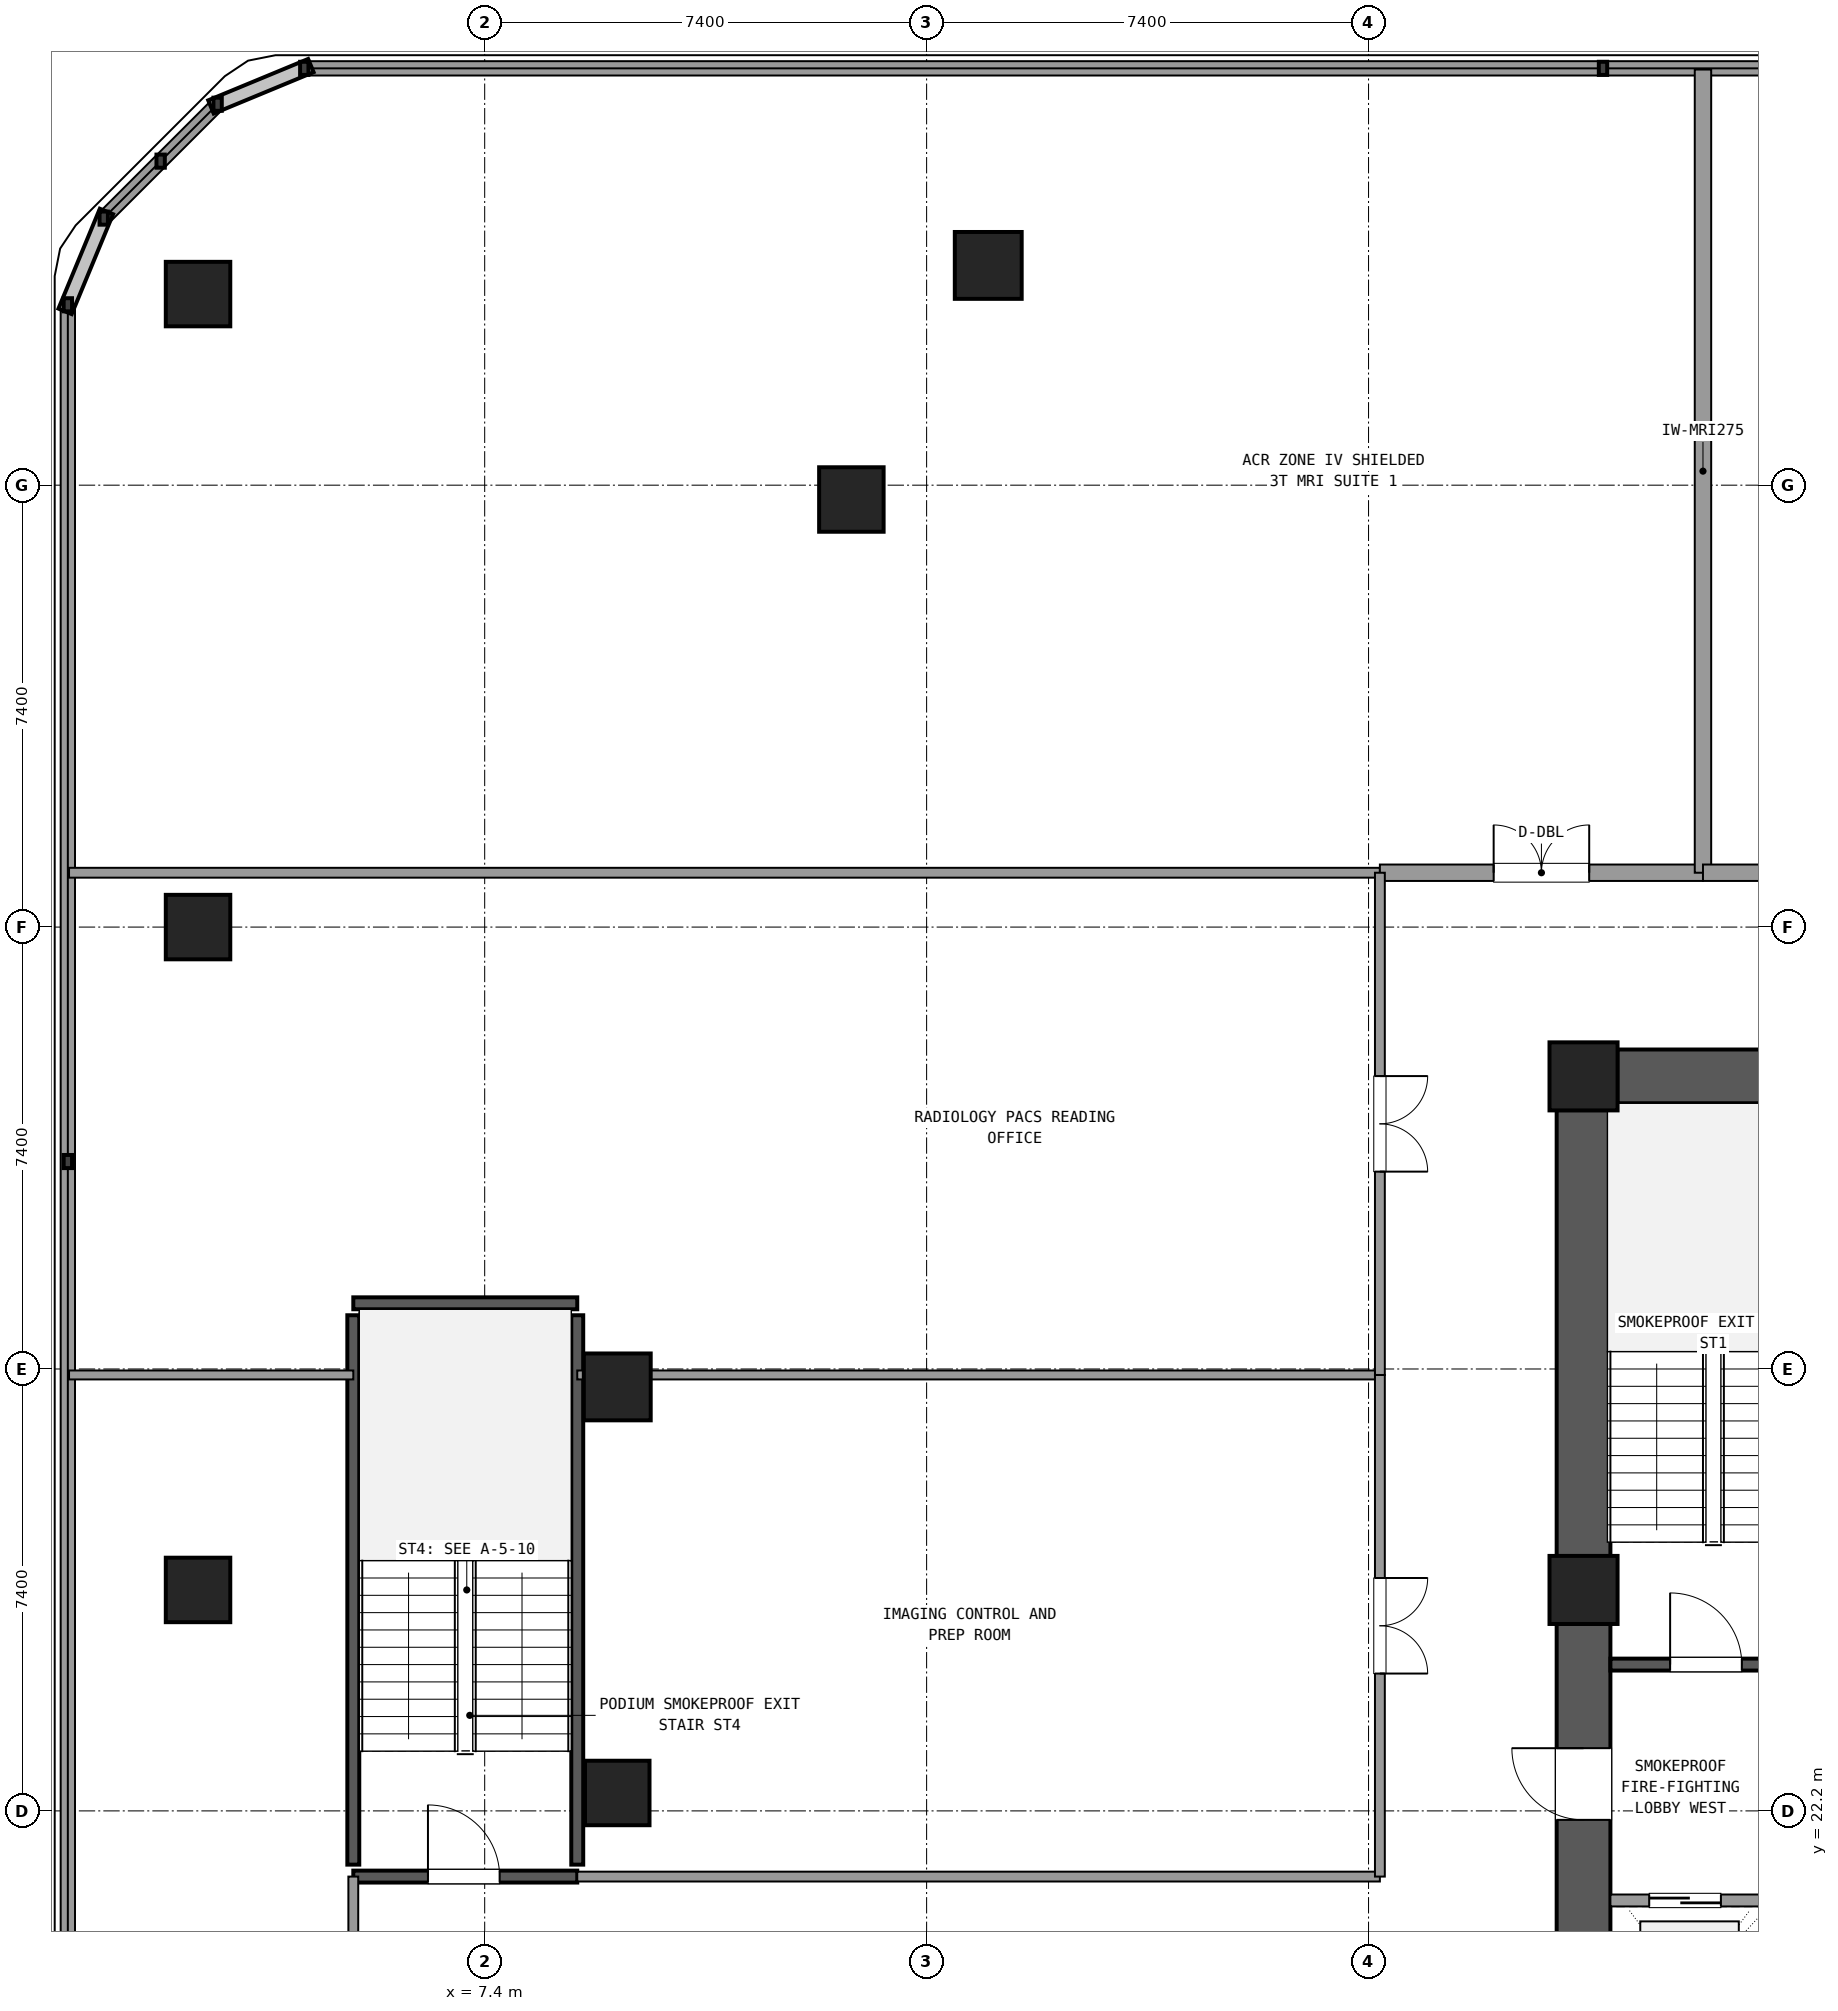
"""IFC4 building model, lengths in metres.
Left out: names, types, materials, properties, quantities, classifications, styles, units other than length and angle.
Written with IfcOpenShell. Run it as: python <this file> out.ifc"""

import sys

from ifc_helpers import new_model, si_unit, direction, frame, frame_2d, origin, origin_2d, place, context, subcontext, project, spatial, rectangle, circle, extrude, element, fill, save


model = new_model("IFC4")
c1 = context("Model", 3, precision=1e-05, world=origin(), true_north=direction((0.0, 1.0)))
c2 = subcontext(c1, "Body", "Model", "MODEL_VIEW")
j1 = project(units=[si_unit("LENGTHUNIT", "METRE"), si_unit("PLANEANGLEUNIT", "RADIAN")], contexts=[c1])
p1 = place(None, origin())
s1 = spatial("IfcSite", under=j1, at=p1, CompositionType="ELEMENT")
p2 = place(p1, origin())
s2 = spatial("IfcBuilding", under=s1, at=p2, CompositionType="ELEMENT")
p3 = place(p2, frame((0.0, 0.0, 9.9)))
s3 = spatial("IfcBuildingStorey", under=s2, at=p3, CompositionType="ELEMENT", Elevation=9.9)
for number, where, z_axis, x_axis in (
    (1, (25.8, 34.5, 0.0), (0.0, 0.0, 1.0), (1.0, 0.0, 0.0)),
    (2, (25.8, 25.9, 0.0), (0.0, 0.0, 1.0), (1.0, 0.0, 0.0)),
):
    element("IfcColumn", number, at=place(p3, frame(where, z_axis=z_axis, x_axis=x_axis)), inside=s3, PredefinedType="COLUMN", context=c2, shape_type="SweptSolid", body=[
        extrude(rectangle(XDim=1.14, YDim=1.14, at=origin_2d()), origin(), (0.0, 0.0, 1.0), 4.5),
    ])
p4 = place(p3, frame((36.435, 34.5, 0.0), z_axis=(0.0, 0.0, 1.0), x_axis=(-1.0, 0.0, 0.0)))
e3 = element("IfcWall", 3, at=p4, inside=s3, PredefinedType="SHEAR", context=c2, shape_type="SweptSolid", body=[
    extrude(rectangle(XDim=10.07, YDim=0.9, at=frame_2d((5.035, 0.0))), origin(), (0.0, 0.0, 1.0), 4.2),
])
p5 = place(p4, frame((4.035, 0.0, 0.0)))
e4 = element("IfcOpeningElement", 4, at=p5, cuts=e3, PredefinedType="OPENING", context=c2, shape_type="SweptSolid", body=[
    extrude(rectangle(XDim=1.2, YDim=2.15, at=frame_2d((0.6, 1.075))), frame((0.0, 0.46, 0.0), z_axis=(0.0, -1.0, 0.0), x_axis=(1.0, 0.0, 0.0)), (0.0, 0.0, 1.0), 0.92),
])
p6 = place(p3, frame((25.8, 33.935, 0.0), z_axis=(0.0, 0.0, 1.0), x_axis=(0.0, -1.0, 0.0)))
e5 = element("IfcWall", 5, at=p6, inside=s3, PredefinedType="SHEAR", context=c2, shape_type="SweptSolid", body=[
    extrude(rectangle(XDim=7.47, YDim=0.9, at=frame_2d((3.735, 0.0))), origin(), (0.0, 0.0, 1.0), 4.2),
])
p7 = place(p3, frame((25.8, 25.335, 0.0), z_axis=(0.0, 0.0, 1.0), x_axis=(0.0, -1.0, 0.0)))
e6 = element("IfcWall", 6, at=p7, inside=s3, PredefinedType="SHEAR", context=c2, shape_type="SweptSolid", body=[
    extrude(rectangle(XDim=7.47, YDim=0.9, at=frame_2d((3.735, 0.0))), origin(), (0.0, 0.0, 1.0), 4.2),
])
p8 = place(p7, frame((2.085, 0.0, 0.0)))
e7 = element("IfcOpeningElement", 7, at=p8, cuts=e6, PredefinedType="OPENING", context=c2, shape_type="SweptSolid", body=[
    extrude(rectangle(XDim=1.2, YDim=2.15, at=frame_2d((0.6, 1.075))), frame((0.0, 0.46, 0.0), z_axis=(0.0, -1.0, 0.0), x_axis=(1.0, 0.0, 0.0)), (0.0, 0.0, 1.0), 0.92),
])
p9 = place(p3, frame((9.62, 22.5, 0.0), z_axis=(0.0, 0.0, 1.0), x_axis=(1.0, 0.0, 0.0)))
e8 = element("IfcColumn", 8, at=p9, inside=s3, PredefinedType="COLUMN", context=c2, shape_type="SweptSolid", body=[
    extrude(rectangle(XDim=1.08, YDim=1.08, at=origin_2d()), origin(), (0.0, 0.0, 1.0), 4.5),
])
p10 = place(p3, frame((15.832, 48.08, 0.0), z_axis=(0.0, 0.0, 1.0), x_axis=(1.0, 0.0, 0.0)))
e9 = element("IfcColumn", 9, at=p10, inside=s3, PredefinedType="COLUMN", context=c2, shape_type="SweptSolid", body=[
    extrude(circle(Radius=0.56, at=origin_2d()), origin(), (0.0, 0.0, 1.0), 4.5),
])
p11 = place(p3, frame((13.54, 44.16, 0.0), z_axis=(0.0, 0.0, 1.0), x_axis=(1.0, 0.0, 0.0)))
e10 = element("IfcColumn", 10, at=p11, inside=s3, PredefinedType="COLUMN", context=c2, shape_type="SweptSolid", body=[
    extrude(rectangle(XDim=1.08, YDim=1.08, at=origin_2d()), origin(), (0.0, 0.0, 1.0), 4.5),
])
p12 = place(p3, frame((9.62, 29.3, 0.0), z_axis=(0.0, 0.0, 1.0), x_axis=(1.0, 0.0, 0.0)))
e11 = element("IfcColumn", 11, at=p12, inside=s3, PredefinedType="COLUMN", context=c2, shape_type="SweptSolid", body=[
    extrude(circle(Radius=0.56, at=origin_2d()), origin(), (0.0, 0.0, 1.0), 4.5),
])
for number, where, z_axis, x_axis in (
    (12, (2.6, 25.9, 0.0), (0.0, 0.0, 1.0), (1.0, 0.0, 0.0)),
    (13, (2.6, 37.0, 0.0), (0.0, 0.0, 1.0), (1.0, 0.0, 0.0)),
    (14, (2.6, 47.6, 0.0), (0.0, 0.0, 1.0), (1.0, 0.0, 0.0)),
):
    element("IfcColumn", number, at=place(p3, frame(where, z_axis=z_axis, x_axis=x_axis)), inside=s3, PredefinedType="COLUMN", context=c2, shape_type="SweptSolid", body=[
        extrude(rectangle(XDim=1.08, YDim=1.08, at=origin_2d()), origin(), (0.0, 0.0, 1.0), 4.5),
    ])
p13 = place(p3, frame((69.621, 51.38, 0.0), z_axis=(0.0, 0.0, 1.0), x_axis=(-1.0, 0.0, 0.0)))
e15 = element("IfcWall", 15, at=p13, inside=s3, PredefinedType="SOLIDWALL", context=c2, shape_type="SweptSolid", body=[
    extrude(rectangle(XDim=65.242, YDim=0.24, at=frame_2d((32.621, 0.0))), origin(), (0.0, 0.0, 1.0), 0.85),
])
p14 = place(p3, frame((2.928, 50.779, 0.0), z_axis=(0.0, 0.0, 1.0), x_axis=(-0.707106781187, -0.707106781187, 0.0)))
e16 = element("IfcWall", 16, at=p14, inside=s3, PredefinedType="SOLIDWALL", context=c2, shape_type="SweptSolid", body=[
    extrude(rectangle(XDim=2.697, YDim=0.24, at=frame_2d((1.348, 0.0))), origin(), (0.0, 0.0, 1.0), 0.85),
])
p15 = place(p3, frame((0.42, 47.421, 0.0), z_axis=(0.0, 0.0, 1.0), x_axis=(0.0, -1.0, 0.0)))
e17 = element("IfcWall", 17, at=p15, inside=s3, PredefinedType="SOLIDWALL", context=c2, shape_type="SweptSolid", body=[
    extrude(rectangle(XDim=43.042, YDim=0.24, at=frame_2d((21.521, 0.0))), origin(), (0.0, 0.0, 1.0), 0.85),
])
p16 = place(p3, frame((26.25, 24.65, 0.0), z_axis=(0.0, 0.0, 1.0), x_axis=(1.0, 0.0, 0.0)))
e18 = element("IfcWall", 18, at=p16, inside=s3, PredefinedType="SHEAR", context=c2, shape_type="SweptSolid", body=[
    extrude(rectangle(XDim=4.0, YDim=0.2, at=frame_2d((2.0, 0.0))), origin(), (0.0, 0.0, 1.0), 4.2),
])
p17 = place(p16, frame((1.0, 0.0, 0.0)))
e19 = element("IfcOpeningElement", 19, at=p17, cuts=e18, PredefinedType="OPENING", context=c2, shape_type="SweptSolid", body=[
    extrude(rectangle(XDim=1.2, YDim=2.15, at=frame_2d((0.6, 1.075))), frame((0.0, 0.11, 0.0), z_axis=(0.0, -1.0, 0.0), x_axis=(1.0, 0.0, 0.0)), (0.0, 0.0, 1.0), 0.22),
])
p18 = place(p3, frame((26.25, 20.7, 0.0), z_axis=(0.0, 0.0, 1.0), x_axis=(1.0, 0.0, 0.0)))
e20 = element("IfcWall", 20, at=p18, inside=s3, PredefinedType="SOLIDWALL", context=c2, shape_type="SweptSolid", body=[
    extrude(rectangle(XDim=4.0, YDim=0.2, at=frame_2d((2.0, 0.0))), origin(), (0.0, 0.0, 1.0), 3.21),
])
p19 = place(p18, frame((0.65, 0.0, 0.0)))
e21 = element("IfcOpeningElement", 21, at=p19, cuts=e20, PredefinedType="OPENING", context=c2, shape_type="SweptSolid", body=[
    extrude(rectangle(XDim=1.2, YDim=2.15, at=frame_2d((0.6, 1.075))), frame((0.0, 0.11, 0.0), z_axis=(0.0, -1.0, 0.0), x_axis=(1.0, 0.0, 0.0)), (0.0, 0.0, 1.0), 0.22),
])
p20 = place(p3, frame((5.2, 21.1, 0.0), z_axis=(0.0, 0.0, 1.0), x_axis=(1.0, 0.0, 0.0)))
e22 = element("IfcWall", 22, at=p20, inside=s3, PredefinedType="SHEAR", context=c2, shape_type="SweptSolid", body=[
    extrude(rectangle(XDim=3.75, YDim=0.2, at=frame_2d((1.875, 0.0))), origin(), (0.0, 0.0, 1.0), 4.2),
])
p21 = place(p20, frame((1.25, 0.0, 0.0)))
e23 = element("IfcOpeningElement", 23, at=p21, cuts=e22, PredefinedType="OPENING", context=c2, shape_type="SweptSolid", body=[
    extrude(rectangle(XDim=1.2, YDim=2.15, at=frame_2d((0.6, 1.075))), frame((0.0, 0.11, 0.0), z_axis=(0.0, -1.0, 0.0), x_axis=(1.0, 0.0, 0.0)), (0.0, 0.0, 1.0), 0.22),
])
p22 = place(p3, frame((5.2, 30.7, 0.0), z_axis=(0.0, 0.0, 1.0), x_axis=(1.0, 0.0, 0.0)))
e24 = element("IfcWall", 24, at=p22, inside=s3, PredefinedType="SHEAR", context=c2, shape_type="SweptSolid", body=[
    extrude(rectangle(XDim=3.75, YDim=0.2, at=frame_2d((1.875, 0.0))), origin(), (0.0, 0.0, 1.0), 4.2),
])
for number, where, z_axis, x_axis in (
    (25, (5.2, 21.3, 0.0), (0.0, 0.0, 1.0), (0.0, 1.0, 0.0)),
    (26, (8.95, 21.3, 0.0), (0.0, 0.0, 1.0), (0.0, 1.0, 0.0)),
):
    element("IfcWall", number, at=place(p3, frame(where, z_axis=z_axis, x_axis=x_axis)), inside=s3, PredefinedType="SHEAR", context=c2, shape_type="SweptSolid", body=[
        extrude(rectangle(XDim=9.2, YDim=0.2, at=frame_2d((4.6, 0.0))), origin(), (0.0, 0.0, 1.0), 4.2),
    ])
p23 = place(p3, frame((0.44, 37.91, 0.0), z_axis=(0.0, 0.0, 1.0), x_axis=(1.0, 0.0, 0.0)))
e27 = element("IfcWall", 27, at=p23, inside=s3, PredefinedType="PARTITIONING", context=c2, shape_type="SweptSolid", body=[
    extrude(rectangle(XDim=21.95, YDim=0.165, at=frame_2d((10.975, 0.0))), origin(), (0.0, 0.0, 1.0), 3.21),
])
p24 = place(p3, frame((5.2, 18.17, 0.0), z_axis=(0.0, 0.0, 1.0), x_axis=(0.0, 1.0, 0.0)))
e28 = element("IfcWall", 28, at=p24, inside=s3, PredefinedType="PARTITIONING", context=c2, shape_type="SweptSolid", body=[
    extrude(rectangle(XDim=2.93, YDim=0.165, at=frame_2d((1.465, 0.0))), origin(), (0.0, 0.0, 1.0), 3.21),
])
p25 = place(p3, frame((8.95, 21.1, 0.0), z_axis=(0.0, 0.0, 1.0), x_axis=(1.0, 0.0, 0.0)))
e29 = element("IfcWall", 29, at=p25, inside=s3, PredefinedType="PARTITIONING", context=c2, shape_type="SweptSolid", body=[
    extrude(rectangle(XDim=13.44, YDim=0.165, at=frame_2d((6.72, 0.0))), origin(), (0.0, 0.0, 1.0), 3.21),
])
p26 = place(p3, frame((22.39, 37.91, 0.0), z_axis=(0.0, 0.0, 1.0), x_axis=(1.0, 0.0, 0.0)))
e30 = element("IfcWall", 30, at=p26, inside=s3, PredefinedType="PARTITIONING", context=c2, shape_type="SweptSolid", body=[
    extrude(rectangle(XDim=5.41, YDim=0.275, at=frame_2d((2.705, 0.0))), origin(), (0.0, 0.0, 1.0), 3.21),
])
p27 = place(p26, frame((1.905, 0.0, 0.0)))
e31 = element("IfcOpeningElement", 31, at=p27, cuts=e30, PredefinedType="OPENING", context=c2, shape_type="SweptSolid", body=[
    extrude(rectangle(XDim=1.6, YDim=2.2, at=frame_2d((0.8, 1.1))), frame((0.0, 0.147, 0.0), z_axis=(0.0, -1.0, 0.0), x_axis=(1.0, 0.0, 0.0)), (0.0, 0.0, 1.0), 0.295),
])
p28 = place(p3, frame((27.8, 37.91, 0.0), z_axis=(0.0, 0.0, 1.0), x_axis=(0.0, 1.0, 0.0)))
e32 = element("IfcWall", 32, at=p28, inside=s3, PredefinedType="PARTITIONING", context=c2, shape_type="SweptSolid", body=[
    extrude(rectangle(XDim=13.45, YDim=0.275, at=frame_2d((6.725, 0.0))), origin(), (0.0, 0.0, 1.0), 3.21),
])
p29 = place(p3, frame((27.8, 37.91, 0.0), z_axis=(0.0, 0.0, 1.0), x_axis=(1.0, 0.0, 0.0)))
e33 = element("IfcWall", 33, at=p29, inside=s3, PredefinedType="PARTITIONING", context=c2, shape_type="SweptSolid", body=[
    extrude(rectangle(XDim=12.0, YDim=0.275, at=frame_2d((6.0, 0.0))), origin(), (0.0, 0.0, 1.0), 3.21),
])
p30 = place(p29, frame((5.2, 0.0, 0.0)))
e34 = element("IfcOpeningElement", 34, at=p30, cuts=e33, PredefinedType="OPENING", context=c2, shape_type="SweptSolid", body=[
    extrude(rectangle(XDim=1.6, YDim=2.2, at=frame_2d((0.8, 1.1))), frame((0.0, 0.147, 0.0), z_axis=(0.0, -1.0, 0.0), x_axis=(1.0, 0.0, 0.0)), (0.0, 0.0, 1.0), 0.295),
])
p31 = place(p3, frame((8.95, 29.5, 0.0), z_axis=(0.0, 0.0, 1.0), x_axis=(1.0, 0.0, 0.0)))
e35 = element("IfcWall", 35, at=p31, inside=s3, PredefinedType="PARTITIONING", context=c2, shape_type="SweptSolid", body=[
    extrude(rectangle(XDim=13.44, YDim=0.15, at=frame_2d((6.72, 0.0))), origin(), (0.0, 0.0, 1.0), 3.21),
])
p32 = place(p3, frame((5.2, 29.5, 0.0), z_axis=(0.0, 0.0, 1.0), x_axis=(-1.0, 0.0, 0.0)))
e36 = element("IfcWall", 36, at=p32, inside=s3, PredefinedType="PARTITIONING", context=c2, shape_type="SweptSolid", body=[
    extrude(rectangle(XDim=4.76, YDim=0.15, at=frame_2d((2.38, 0.0))), origin(), (0.0, 0.0, 1.0), 3.21),
])
p33 = place(p3, frame((22.39, 21.1, 0.0), z_axis=(0.0, 0.0, 1.0), x_axis=(0.0, 1.0, 0.0)))
e37 = element("IfcWall", 37, at=p33, inside=s3, PredefinedType="PARTITIONING", context=c2, shape_type="SweptSolid", body=[
    extrude(rectangle(XDim=8.4, YDim=0.165, at=frame_2d((4.2, 0.0))), origin(), (0.0, 0.0, 1.0), 3.21),
])
p34 = place(p33, frame((3.4, 0.0, 0.0)))
e38 = element("IfcOpeningElement", 38, at=p34, cuts=e37, PredefinedType="OPENING", context=c2, shape_type="SweptSolid", body=[
    extrude(rectangle(XDim=1.6, YDim=2.2, at=frame_2d((0.8, 1.1))), frame((0.0, 0.093, 0.0), z_axis=(0.0, -1.0, 0.0), x_axis=(1.0, 0.0, 0.0)), (0.0, 0.0, 1.0), 0.185),
])
p35 = place(p3, frame((22.39, 29.5, 0.0), z_axis=(0.0, 0.0, 1.0), x_axis=(0.0, 1.0, 0.0)))
e39 = element("IfcWall", 39, at=p35, inside=s3, PredefinedType="PARTITIONING", context=c2, shape_type="SweptSolid", body=[
    extrude(rectangle(XDim=8.41, YDim=0.165, at=frame_2d((4.205, 0.0))), origin(), (0.0, 0.0, 1.0), 3.21),
])
p36 = place(p35, frame((3.405, 0.0, 0.0)))
e40 = element("IfcOpeningElement", 40, at=p36, cuts=e39, PredefinedType="OPENING", context=c2, shape_type="SweptSolid", body=[
    extrude(rectangle(XDim=1.6, YDim=2.2, at=frame_2d((0.8, 1.1))), frame((0.0, 0.093, 0.0), z_axis=(0.0, -1.0, 0.0), x_axis=(1.0, 0.0, 0.0)), (0.0, 0.0, 1.0), 0.185),
])
p37 = place(p17, origin())
e41 = element("IfcDoor", 41, at=p37, inside=s3, OperationType="SINGLE_SWING_LEFT", PredefinedType="DOOR", context=c2, shape_type="SweptSolid", body=[
    extrude(rectangle(XDim=1.2, YDim=2.15, at=frame_2d((0.6, 1.075))), frame((0.0, 0.025, 0.0), z_axis=(0.0, -1.0, 0.0), x_axis=(1.0, 0.0, 0.0)), (0.0, 0.0, 1.0), 0.05),
])
fill(e19, e41)
p38 = place(p19, origin())
e42 = element("IfcDoor", 42, at=p38, inside=s3, OperationType="SLIDING_TO_LEFT", PredefinedType="DOOR", context=c2, shape_type="SweptSolid", body=[
    extrude(rectangle(XDim=1.2, YDim=2.15, at=frame_2d((0.6, 1.075))), frame((0.0, 0.025, 0.0), z_axis=(0.0, -1.0, 0.0), x_axis=(1.0, 0.0, 0.0)), (0.0, 0.0, 1.0), 0.05),
])
fill(e21, e42)
p39 = place(p8, frame((1.2, 0.0, 0.0), z_axis=(0.0, 0.0, 1.0), x_axis=(-1.0, 0.0, 0.0)))
e43 = element("IfcDoor", 43, at=p39, inside=s3, OperationType="SINGLE_SWING_LEFT", PredefinedType="DOOR", context=c2, shape_type="SweptSolid", body=[
    extrude(rectangle(XDim=1.2, YDim=2.15, at=frame_2d((0.6, 1.075))), frame((0.0, 0.025, 0.0), z_axis=(0.0, -1.0, 0.0), x_axis=(1.0, 0.0, 0.0)), (0.0, 0.0, 1.0), 0.05),
])
fill(e7, e43)
p40 = place(p21, origin())
e44 = element("IfcDoor", 44, at=p40, inside=s3, OperationType="SINGLE_SWING_LEFT", PredefinedType="DOOR", context=c2, shape_type="SweptSolid", body=[
    extrude(rectangle(XDim=1.2, YDim=2.15, at=frame_2d((0.6, 1.075))), frame((0.0, 0.025, 0.0), z_axis=(0.0, -1.0, 0.0), x_axis=(1.0, 0.0, 0.0)), (0.0, 0.0, 1.0), 0.05),
])
fill(e23, e44)
p41 = place(p27, origin())
e45 = element("IfcDoor", 45, at=p41, inside=s3, OperationType="DOUBLE_DOOR_SINGLE_SWING", PredefinedType="DOOR", context=c2, shape_type="SweptSolid", body=[
    extrude(rectangle(XDim=1.6, YDim=2.2, at=frame_2d((0.8, 1.1))), frame((0.0, 0.025, 0.0), z_axis=(0.0, -1.0, 0.0), x_axis=(1.0, 0.0, 0.0)), (0.0, 0.0, 1.0), 0.05),
])
fill(e31, e45)
p42 = place(p34, frame((1.6, 0.0, 0.0), z_axis=(0.0, 0.0, 1.0), x_axis=(-1.0, 0.0, 0.0)))
e46 = element("IfcDoor", 46, at=p42, inside=s3, OperationType="DOUBLE_DOOR_SINGLE_SWING", PredefinedType="DOOR", context=c2, shape_type="SweptSolid", body=[
    extrude(rectangle(XDim=1.6, YDim=2.2, at=frame_2d((0.8, 1.1))), frame((0.0, 0.025, 0.0), z_axis=(0.0, -1.0, 0.0), x_axis=(1.0, 0.0, 0.0)), (0.0, 0.0, 1.0), 0.05),
])
fill(e38, e46)
p43 = place(p36, frame((1.6, 0.0, 0.0), z_axis=(0.0, 0.0, 1.0), x_axis=(-1.0, 0.0, 0.0)))
e47 = element("IfcDoor", 47, at=p43, inside=s3, OperationType="DOUBLE_DOOR_SINGLE_SWING", PredefinedType="DOOR", context=c2, shape_type="SweptSolid", body=[
    extrude(rectangle(XDim=1.6, YDim=2.2, at=frame_2d((0.8, 1.1))), frame((0.0, 0.025, 0.0), z_axis=(0.0, -1.0, 0.0), x_axis=(1.0, 0.0, 0.0)), (0.0, 0.0, 1.0), 0.05),
])
fill(e40, e47)
save(model, sys.argv[1])
